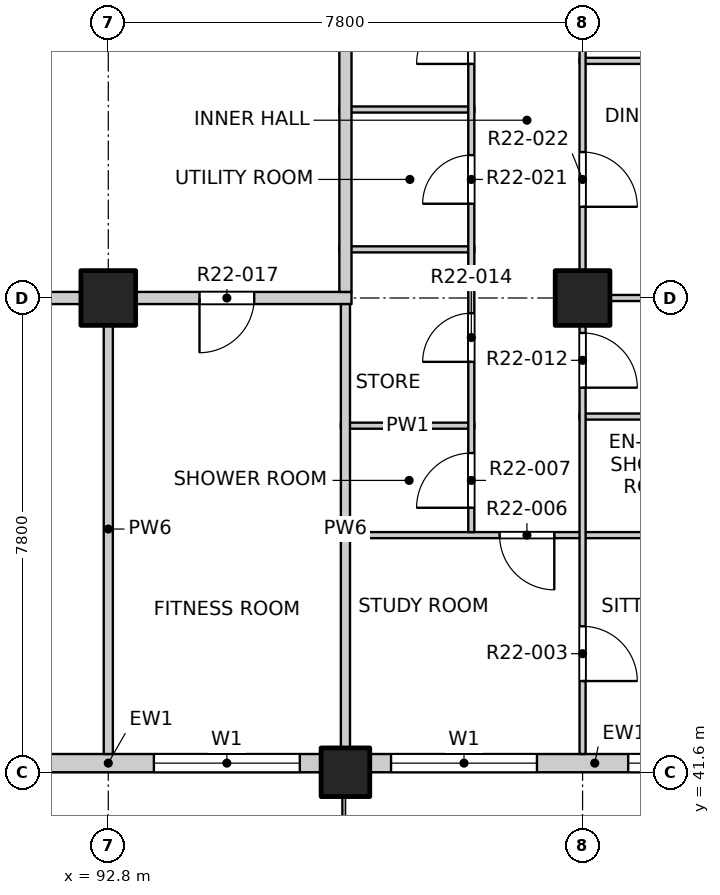
"""IFC4 building model, lengths in metres.
Left out: names, types, materials, properties, quantities, classifications, styles, units other than length and angle.
Written with IfcOpenShell. Run it as: python <this file> out.ifc"""

import sys

from ifc_helpers import new_model, si_unit, direction, frame, frame_2d, origin, origin_2d, place, context, subcontext, project, spatial, rectangle, extrude, element, fill, save


model = new_model("IFC4")
c1 = context("Model", 3, precision=1e-05, world=origin(), true_north=direction((0.0, 1.0)))
c2 = subcontext(c1, "Body", "Model", "MODEL_VIEW")
j1 = project(units=[si_unit("LENGTHUNIT", "METRE"), si_unit("PLANEANGLEUNIT", "RADIAN")], contexts=[c1])
p1 = place(None, origin())
s1 = spatial("IfcSite", under=j1, at=p1, CompositionType="ELEMENT")
p2 = place(p1, origin())
s2 = spatial("IfcBuilding", under=s1, at=p2, CompositionType="ELEMENT")
p3 = place(p2, frame((0.0, 0.0, 224.5)))
s3 = spatial("IfcBuildingStorey", under=s2, at=p3, CompositionType="ELEMENT", Elevation=224.5)
p4 = place(p3, frame((96.7, 41.6, -0.25), z_axis=(0.0, 0.0, 1.0), x_axis=(1.0, 0.0, 0.0)))
e1 = element("IfcColumn", 1, at=p4, inside=s3, PredefinedType="COLUMN", context=c2, shape_type="SweptSolid", body=[
    extrude(rectangle(XDim=0.8, YDim=0.8, at=origin_2d()), origin(), (0.0, 0.0, 1.0), 3.4),
])
for number, where, z_axis, x_axis in (
    (2, (92.8, 49.4, -0.25), (0.0, 0.0, 1.0), (1.0, 0.0, 0.0)),
    (3, (100.6, 49.4, -0.25), (0.0, 0.0, 1.0), (1.0, 0.0, 0.0)),
):
    element("IfcColumn", number, at=place(p3, frame(where, z_axis=z_axis, x_axis=x_axis)), inside=s3, PredefinedType="COLUMN", context=c2, shape_type="SweptSolid", body=[
        extrude(rectangle(XDim=0.9, YDim=0.9, at=origin_2d()), origin(), (0.0, 0.0, 1.0), 3.4),
    ])
p5 = place(p3, frame((89.3, 41.75, 0.0), z_axis=(0.0, 0.0, 1.0), x_axis=(1.0, 0.0, 0.0)))
e4 = element("IfcWall", 4, at=p5, inside=s3, PredefinedType="SOLIDWALL", context=c2, shape_type="SweptSolid", body=[
    extrude(rectangle(XDim=7.0, YDim=0.3, at=frame_2d((3.5, 0.0))), origin(), (0.0, 0.0, 1.0), 2.7),
])
p6 = place(p5, frame((0.65, 0.0, 0.0)))
e5 = element("IfcOpeningElement", 5, at=p6, cuts=e4, PredefinedType="OPENING", context=c2, shape_type="SweptSolid", body=[
    extrude(rectangle(XDim=1.8, YDim=2.4, at=frame_2d((0.9, 1.2))), frame((0.0, 0.16, 0.0), z_axis=(0.0, -1.0, 0.0), x_axis=(1.0, 0.0, 0.0)), (0.0, 0.0, 1.0), 0.32),
])
p7 = place(p5, frame((4.25, 0.0, 0.9)))
e6 = element("IfcOpeningElement", 6, at=p7, cuts=e4, PredefinedType="OPENING", context=c2, shape_type="SweptSolid", body=[
    extrude(rectangle(XDim=2.4, YDim=1.8, at=frame_2d((1.2, 0.9))), frame((0.0, 0.16, 0.0), z_axis=(0.0, -1.0, 0.0), x_axis=(1.0, 0.0, 0.0)), (0.0, 0.0, 1.0), 0.32),
])
p8 = place(p3, frame((97.1, 41.75, 0.0), z_axis=(0.0, 0.0, 1.0), x_axis=(1.0, 0.0, 0.0)))
e7 = element("IfcWall", 7, at=p8, inside=s3, PredefinedType="SOLIDWALL", context=c2, shape_type="SweptSolid", body=[
    extrude(rectangle(XDim=7.4, YDim=0.3, at=frame_2d((3.7, 0.0))), origin(), (0.0, 0.0, 1.0), 2.7),
])
p9 = place(p8, frame((0.35, 0.0, 0.9)))
e8 = element("IfcOpeningElement", 8, at=p9, cuts=e7, PredefinedType="OPENING", context=c2, shape_type="SweptSolid", body=[
    extrude(rectangle(XDim=2.4, YDim=1.8, at=frame_2d((1.2, 0.9))), frame((0.0, 0.16, 0.0), z_axis=(0.0, -1.0, 0.0), x_axis=(1.0, 0.0, 0.0)), (0.0, 0.0, 1.0), 0.32),
])
p10 = place(p8, frame((4.25, 0.0, 0.9)))
e9 = element("IfcOpeningElement", 9, at=p10, cuts=e7, PredefinedType="OPENING", context=c2, shape_type="SweptSolid", body=[
    extrude(rectangle(XDim=2.4, YDim=1.8, at=frame_2d((1.2, 0.9))), frame((0.0, 0.16, 0.0), z_axis=(0.0, -1.0, 0.0), x_axis=(1.0, 0.0, 0.0)), (0.0, 0.0, 1.0), 0.32),
])
p11 = place(p3, frame((96.625, 45.5, 0.0), z_axis=(0.0, 0.0, 1.0), x_axis=(1.0, 0.0, 0.0)))
e10 = element("IfcWall", 10, at=p11, inside=s3, PredefinedType="PARTITIONING", context=c2, shape_type="SweptSolid", body=[
    extrude(rectangle(XDim=11.475, YDim=0.1, at=frame_2d((5.738, 0.0))), origin(), (0.0, 0.0, 1.0), 3.15),
])
p12 = place(p11, frame((2.61, 0.0, 0.0)))
e11 = element("IfcOpeningElement", 11, at=p12, cuts=e10, PredefinedType="OPENING", context=c2, shape_type="SweptSolid", body=[
    extrude(rectangle(XDim=0.9, YDim=2.1, at=frame_2d((0.45, 1.05))), frame((0.0, 0.06, 0.0), z_axis=(0.0, -1.0, 0.0), x_axis=(1.0, 0.0, 0.0)), (0.0, 0.0, 1.0), 0.12),
])
p13 = place(p3, frame((96.625, 47.3, 0.0), z_axis=(0.0, 0.0, 1.0), x_axis=(1.0, 0.0, 0.0)))
e12 = element("IfcWall", 12, at=p13, inside=s3, PredefinedType="PARTITIONING", context=c2, shape_type="SweptSolid", body=[
    extrude(rectangle(XDim=2.195, YDim=0.1, at=frame_2d((1.098, 0.0))), origin(), (0.0, 0.0, 1.0), 3.15),
])
p14 = place(p3, frame((100.55, 47.45, 0.0), z_axis=(0.0, 0.0, 1.0), x_axis=(1.0, 0.0, 0.0)))
e13 = element("IfcWall", 13, at=p14, inside=s3, PredefinedType="PARTITIONING", context=c2, shape_type="SweptSolid", body=[
    extrude(rectangle(XDim=3.7, YDim=0.1, at=frame_2d((1.85, 0.0))), origin(), (0.0, 0.0, 1.0), 3.15),
])
p15 = place(p3, frame((73.2, 49.4, 0.0), z_axis=(0.0, 0.0, 1.0), x_axis=(1.0, 0.0, 0.0)))
e14 = element("IfcWall", 14, at=p15, inside=s3, PredefinedType="PARTITIONING", context=c2, shape_type="SweptSolid", body=[
    extrude(rectangle(XDim=23.6, YDim=0.2, at=frame_2d((11.8, 0.0))), origin(), (0.0, 0.0, 1.0), 3.15),
])
p16 = place(p15, frame((5.35, 0.0, 0.0)))
e15 = element("IfcOpeningElement", 15, at=p16, cuts=e14, PredefinedType="OPENING", context=c2, shape_type="SweptSolid", body=[
    extrude(rectangle(XDim=1.2, YDim=2.1, at=frame_2d((0.6, 1.05))), frame((0.0, 0.11, 0.0), z_axis=(0.0, -1.0, 0.0), x_axis=(1.0, 0.0, 0.0)), (0.0, 0.0, 1.0), 0.22),
])
p17 = place(p15, frame((15.1, 0.0, 0.0)))
e16 = element("IfcOpeningElement", 16, at=p17, cuts=e14, PredefinedType="OPENING", context=c2, shape_type="SweptSolid", body=[
    extrude(rectangle(XDim=1.2, YDim=2.1, at=frame_2d((0.6, 1.05))), frame((0.0, 0.11, 0.0), z_axis=(0.0, -1.0, 0.0), x_axis=(1.0, 0.0, 0.0)), (0.0, 0.0, 1.0), 0.22),
])
p18 = place(p15, frame((21.1, 0.0, 0.0)))
e17 = element("IfcOpeningElement", 17, at=p18, cuts=e14, PredefinedType="OPENING", context=c2, shape_type="SweptSolid", body=[
    extrude(rectangle(XDim=0.9, YDim=2.1, at=frame_2d((0.45, 1.05))), frame((0.0, 0.11, 0.0), z_axis=(0.0, -1.0, 0.0), x_axis=(1.0, 0.0, 0.0)), (0.0, 0.0, 1.0), 0.22),
])
p19 = place(p3, frame((100.55, 49.4, 0.0), z_axis=(0.0, 0.0, 1.0), x_axis=(1.0, 0.0, 0.0)))
e18 = element("IfcWall", 18, at=p19, inside=s3, PredefinedType="PARTITIONING", context=c2, shape_type="SweptSolid", body=[
    extrude(rectangle(XDim=7.55, YDim=0.1, at=frame_2d((3.775, 0.0))), origin(), (0.0, 0.0, 1.0), 3.15),
])
for number, where, z_axis, x_axis in (
    (19, (96.6, 50.2, 0.0), (0.0, 0.0, 1.0), (1.0, 0.0, 0.0)),
    (20, (96.6, 52.5, 0.0), (0.0, 0.0, 1.0), (1.0, 0.0, 0.0)),
):
    element("IfcWall", number, at=place(p3, frame(where, z_axis=z_axis, x_axis=x_axis)), inside=s3, PredefinedType="PARTITIONING", context=c2, shape_type="SweptSolid", body=[
        extrude(rectangle(XDim=2.22, YDim=0.1, at=frame_2d((1.11, 0.0))), origin(), (0.0, 0.0, 1.0), 3.15),
    ])
p20 = place(p3, frame((100.55, 53.3, 0.0), z_axis=(0.0, 0.0, 1.0), x_axis=(1.0, 0.0, 0.0)))
e21 = element("IfcWall", 21, at=p20, inside=s3, PredefinedType="PARTITIONING", context=c2, shape_type="SweptSolid", body=[
    extrude(rectangle(XDim=7.55, YDim=0.1, at=frame_2d((3.775, 0.0))), origin(), (0.0, 0.0, 1.0), 3.15),
])
for number, where, z_axis, x_axis in (
    (22, (92.8, 41.9, 0.0), (0.0, 0.0, 1.0), (0.0, 1.0, 0.0)),
    (23, (96.7, 41.9, 0.0), (0.0, 0.0, 1.0), (0.0, 1.0, 0.0)),
):
    element("IfcWall", number, at=place(p3, frame(where, z_axis=z_axis, x_axis=x_axis)), inside=s3, PredefinedType="PARTITIONING", context=c2, shape_type="SweptSolid", body=[
        extrude(rectangle(XDim=7.4, YDim=0.15, at=frame_2d((3.7, 0.0))), origin(), (0.0, 0.0, 1.0), 3.15),
    ])
p21 = place(p3, frame((96.7, 49.5, 0.0), z_axis=(0.0, 0.0, 1.0), x_axis=(0.0, 1.0, 0.0)))
e24 = element("IfcWall", 24, at=p21, inside=s3, PredefinedType="PARTITIONING", context=c2, shape_type="SweptSolid", body=[
    extrude(rectangle(XDim=34.9, YDim=0.2, at=frame_2d((17.45, 0.0))), origin(), (0.0, 0.0, 1.0), 3.15),
])
p22 = place(p21, frame((9.675, 0.0, 0.0)))
e25 = element("IfcOpeningElement", 25, at=p22, cuts=e24, PredefinedType="OPENING", context=c2, shape_type="SweptSolid", body=[
    extrude(rectangle(XDim=1.0, YDim=2.1, at=frame_2d((0.5, 1.05))), frame((0.0, 0.11, 0.0), z_axis=(0.0, -1.0, 0.0), x_axis=(1.0, 0.0, 0.0)), (0.0, 0.0, 1.0), 0.22),
])
p23 = place(p21, frame((22.925, 0.0, 0.0)))
e26 = element("IfcOpeningElement", 26, at=p23, cuts=e24, PredefinedType="OPENING", context=c2, shape_type="SweptSolid", body=[
    extrude(rectangle(XDim=1.0, YDim=2.1, at=frame_2d((0.5, 1.05))), frame((0.0, 0.11, 0.0), z_axis=(0.0, -1.0, 0.0), x_axis=(1.0, 0.0, 0.0)), (0.0, 0.0, 1.0), 0.22),
])
p24 = place(p21, frame((33.025, 0.0, 0.0)))
e27 = element("IfcOpeningElement", 27, at=p24, cuts=e24, PredefinedType="OPENING", context=c2, shape_type="SweptSolid", body=[
    extrude(rectangle(XDim=1.0, YDim=2.1, at=frame_2d((0.5, 1.05))), frame((0.0, 0.11, 0.0), z_axis=(0.0, -1.0, 0.0), x_axis=(1.0, 0.0, 0.0)), (0.0, 0.0, 1.0), 0.22),
])
p25 = place(p3, frame((98.77, 45.55, 0.0), z_axis=(0.0, 0.0, 1.0), x_axis=(0.0, 1.0, 0.0)))
e28 = element("IfcWall", 28, at=p25, inside=s3, PredefinedType="PARTITIONING", context=c2, shape_type="SweptSolid", body=[
    extrude(rectangle(XDim=12.3, YDim=0.1, at=frame_2d((6.15, 0.0))), origin(), (0.0, 0.0, 1.0), 3.15),
])
p26 = place(p25, frame((0.4, 0.0, 0.0)))
e29 = element("IfcOpeningElement", 29, at=p26, cuts=e28, PredefinedType="OPENING", context=c2, shape_type="SweptSolid", body=[
    extrude(rectangle(XDim=0.9, YDim=2.1, at=frame_2d((0.45, 1.05))), frame((0.0, 0.06, 0.0), z_axis=(0.0, -1.0, 0.0), x_axis=(1.0, 0.0, 0.0)), (0.0, 0.0, 1.0), 0.12),
])
p27 = place(p25, frame((2.8, 0.0, 0.0)))
e30 = element("IfcOpeningElement", 30, at=p27, cuts=e28, PredefinedType="OPENING", context=c2, shape_type="SweptSolid", body=[
    extrude(rectangle(XDim=0.8, YDim=2.1, at=frame_2d((0.4, 1.05))), frame((0.0, 0.06, 0.0), z_axis=(0.0, -1.0, 0.0), x_axis=(1.0, 0.0, 0.0)), (0.0, 0.0, 1.0), 0.12),
])
p28 = place(p25, frame((5.4, 0.0, 0.0)))
e31 = element("IfcOpeningElement", 31, at=p28, cuts=e28, PredefinedType="OPENING", context=c2, shape_type="SweptSolid", body=[
    extrude(rectangle(XDim=0.8, YDim=2.1, at=frame_2d((0.4, 1.05))), frame((0.0, 0.06, 0.0), z_axis=(0.0, -1.0, 0.0), x_axis=(1.0, 0.0, 0.0)), (0.0, 0.0, 1.0), 0.12),
])
p29 = place(p25, frame((7.7, 0.0, 0.0)))
e32 = element("IfcOpeningElement", 32, at=p29, cuts=e28, PredefinedType="OPENING", context=c2, shape_type="SweptSolid", body=[
    extrude(rectangle(XDim=0.9, YDim=2.1, at=frame_2d((0.45, 1.05))), frame((0.0, 0.06, 0.0), z_axis=(0.0, -1.0, 0.0), x_axis=(1.0, 0.0, 0.0)), (0.0, 0.0, 1.0), 0.12),
])
p30 = place(p25, frame((10.45, 0.0, 0.0)))
e33 = element("IfcOpeningElement", 33, at=p30, cuts=e28, PredefinedType="OPENING", context=c2, shape_type="SweptSolid", body=[
    extrude(rectangle(XDim=0.8, YDim=2.1, at=frame_2d((0.4, 1.05))), frame((0.0, 0.06, 0.0), z_axis=(0.0, -1.0, 0.0), x_axis=(1.0, 0.0, 0.0)), (0.0, 0.0, 1.0), 0.12),
])
p31 = place(p3, frame((100.6, 41.9, 0.0), z_axis=(0.0, 0.0, 1.0), x_axis=(0.0, 1.0, 0.0)))
e34 = element("IfcWall", 34, at=p31, inside=s3, PredefinedType="PARTITIONING", context=c2, shape_type="SweptSolid", body=[
    extrude(rectangle(XDim=46.2, YDim=0.1, at=frame_2d((23.1, 0.0))), origin(), (0.0, 0.0, 1.0), 3.15),
])
p32 = place(p31, frame((1.2, 0.0, 0.0)))
e35 = element("IfcOpeningElement", 35, at=p32, cuts=e34, PredefinedType="OPENING", context=c2, shape_type="SweptSolid", body=[
    extrude(rectangle(XDim=0.9, YDim=2.1, at=frame_2d((0.45, 1.05))), frame((0.0, 0.06, 0.0), z_axis=(0.0, -1.0, 0.0), x_axis=(1.0, 0.0, 0.0)), (0.0, 0.0, 1.0), 0.12),
])
p33 = place(p31, frame((6.025, 0.0, 0.0)))
e36 = element("IfcOpeningElement", 36, at=p33, cuts=e34, PredefinedType="OPENING", context=c2, shape_type="SweptSolid", body=[
    extrude(rectangle(XDim=0.9, YDim=2.1, at=frame_2d((0.45, 1.05))), frame((0.0, 0.06, 0.0), z_axis=(0.0, -1.0, 0.0), x_axis=(1.0, 0.0, 0.0)), (0.0, 0.0, 1.0), 0.12),
])
p34 = place(p31, frame((9.0, 0.0, 0.0)))
e37 = element("IfcOpeningElement", 37, at=p34, cuts=e34, PredefinedType="OPENING", context=c2, shape_type="SweptSolid", body=[
    extrude(rectangle(XDim=0.9, YDim=2.1, at=frame_2d((0.45, 1.05))), frame((0.0, 0.06, 0.0), z_axis=(0.0, -1.0, 0.0), x_axis=(1.0, 0.0, 0.0)), (0.0, 0.0, 1.0), 0.12),
])
p35 = place(p31, frame((12.9, 0.0, 0.0)))
e38 = element("IfcOpeningElement", 38, at=p35, cuts=e34, PredefinedType="OPENING", context=c2, shape_type="SweptSolid", body=[
    extrude(rectangle(XDim=0.9, YDim=2.1, at=frame_2d((0.45, 1.05))), frame((0.0, 0.06, 0.0), z_axis=(0.0, -1.0, 0.0), x_axis=(1.0, 0.0, 0.0)), (0.0, 0.0, 1.0), 0.12),
])
p36 = place(p31, frame((17.775, 0.0, 0.0)))
e39 = element("IfcOpeningElement", 39, at=p36, cuts=e34, PredefinedType="OPENING", context=c2, shape_type="SweptSolid", body=[
    extrude(rectangle(XDim=0.9, YDim=2.1, at=frame_2d((0.45, 1.05))), frame((0.0, 0.06, 0.0), z_axis=(0.0, -1.0, 0.0), x_axis=(1.0, 0.0, 0.0)), (0.0, 0.0, 1.0), 0.12),
])
p37 = place(p31, frame((21.625, 0.0, 0.0)))
e40 = element("IfcOpeningElement", 40, at=p37, cuts=e34, PredefinedType="OPENING", context=c2, shape_type="SweptSolid", body=[
    extrude(rectangle(XDim=0.9, YDim=2.1, at=frame_2d((0.45, 1.05))), frame((0.0, 0.06, 0.0), z_axis=(0.0, -1.0, 0.0), x_axis=(1.0, 0.0, 0.0)), (0.0, 0.0, 1.0), 0.12),
])
p38 = place(p31, frame((25.575, 0.0, 0.0)))
e41 = element("IfcOpeningElement", 41, at=p38, cuts=e34, PredefinedType="OPENING", context=c2, shape_type="SweptSolid", body=[
    extrude(rectangle(XDim=0.9, YDim=2.1, at=frame_2d((0.45, 1.05))), frame((0.0, 0.06, 0.0), z_axis=(0.0, -1.0, 0.0), x_axis=(1.0, 0.0, 0.0)), (0.0, 0.0, 1.0), 0.12),
])
p39 = place(p31, frame((28.5, 0.0, 0.0)))
e42 = element("IfcOpeningElement", 42, at=p39, cuts=e34, PredefinedType="OPENING", context=c2, shape_type="SweptSolid", body=[
    extrude(rectangle(XDim=0.9, YDim=2.1, at=frame_2d((0.45, 1.05))), frame((0.0, 0.06, 0.0), z_axis=(0.0, -1.0, 0.0), x_axis=(1.0, 0.0, 0.0)), (0.0, 0.0, 1.0), 0.12),
])
p40 = place(p31, frame((33.375, 0.0, 0.0)))
e43 = element("IfcOpeningElement", 43, at=p40, cuts=e34, PredefinedType="OPENING", context=c2, shape_type="SweptSolid", body=[
    extrude(rectangle(XDim=0.9, YDim=2.1, at=frame_2d((0.45, 1.05))), frame((0.0, 0.06, 0.0), z_axis=(0.0, -1.0, 0.0), x_axis=(1.0, 0.0, 0.0)), (0.0, 0.0, 1.0), 0.12),
])
p41 = place(p31, frame((36.3, 0.0, 0.0)))
e44 = element("IfcOpeningElement", 44, at=p41, cuts=e34, PredefinedType="OPENING", context=c2, shape_type="SweptSolid", body=[
    extrude(rectangle(XDim=0.9, YDim=2.1, at=frame_2d((0.45, 1.05))), frame((0.0, 0.06, 0.0), z_axis=(0.0, -1.0, 0.0), x_axis=(1.0, 0.0, 0.0)), (0.0, 0.0, 1.0), 0.12),
])
p42 = place(p31, frame((40.2, 0.0, 0.0)))
e45 = element("IfcOpeningElement", 45, at=p42, cuts=e34, PredefinedType="OPENING", context=c2, shape_type="SweptSolid", body=[
    extrude(rectangle(XDim=0.9, YDim=2.1, at=frame_2d((0.45, 1.05))), frame((0.0, 0.06, 0.0), z_axis=(0.0, -1.0, 0.0), x_axis=(1.0, 0.0, 0.0)), (0.0, 0.0, 1.0), 0.12),
])
p43 = place(p31, frame((44.1, 0.0, 0.0)))
e46 = element("IfcOpeningElement", 46, at=p43, cuts=e34, PredefinedType="OPENING", context=c2, shape_type="SweptSolid", body=[
    extrude(rectangle(XDim=0.9, YDim=2.1, at=frame_2d((0.45, 1.05))), frame((0.0, 0.06, 0.0), z_axis=(0.0, -1.0, 0.0), x_axis=(1.0, 0.0, 0.0)), (0.0, 0.0, 1.0), 0.12),
])
p44 = place(p7, origin())
e47 = element("IfcWindow", 47, at=p44, inside=s3, PartitioningType="DOUBLE_PANEL_VERTICAL", PredefinedType="WINDOW", context=c2, shape_type="SweptSolid", body=[
    extrude(rectangle(XDim=2.4, YDim=1.8, at=frame_2d((1.2, 0.9))), frame((0.0, 0.03, 0.0), z_axis=(0.0, -1.0, 0.0), x_axis=(1.0, 0.0, 0.0)), (0.0, 0.0, 1.0), 0.06),
])
fill(e6, e47)
p45 = place(p9, origin())
e48 = element("IfcWindow", 48, at=p45, inside=s3, PartitioningType="DOUBLE_PANEL_VERTICAL", PredefinedType="WINDOW", context=c2, shape_type="SweptSolid", body=[
    extrude(rectangle(XDim=2.4, YDim=1.8, at=frame_2d((1.2, 0.9))), frame((0.0, 0.03, 0.0), z_axis=(0.0, -1.0, 0.0), x_axis=(1.0, 0.0, 0.0)), (0.0, 0.0, 1.0), 0.06),
])
fill(e8, e48)
p46 = place(p10, origin())
e49 = element("IfcWindow", 49, at=p46, inside=s3, PartitioningType="DOUBLE_PANEL_VERTICAL", PredefinedType="WINDOW", context=c2, shape_type="SweptSolid", body=[
    extrude(rectangle(XDim=2.4, YDim=1.8, at=frame_2d((1.2, 0.9))), frame((0.0, 0.03, 0.0), z_axis=(0.0, -1.0, 0.0), x_axis=(1.0, 0.0, 0.0)), (0.0, 0.0, 1.0), 0.06),
])
fill(e9, e49)
p47 = place(p32, origin())
e50 = element("IfcDoor", 50, at=p47, inside=s3, OperationType="SINGLE_SWING_RIGHT", PredefinedType="DOOR", context=c2, shape_type="SweptSolid", body=[
    extrude(rectangle(XDim=0.9, YDim=2.1, at=frame_2d((0.45, 1.05))), frame((0.0, 0.025, 0.0), z_axis=(0.0, -1.0, 0.0), x_axis=(1.0, 0.0, 0.0)), (0.0, 0.0, 1.0), 0.05),
])
fill(e35, e50)
p48 = place(p12, origin())
e51 = element("IfcDoor", 51, at=p48, inside=s3, OperationType="SINGLE_SWING_LEFT", PredefinedType="DOOR", context=c2, shape_type="SweptSolid", body=[
    extrude(rectangle(XDim=0.9, YDim=2.1, at=frame_2d((0.45, 1.05))), frame((0.0, 0.025, 0.0), z_axis=(0.0, -1.0, 0.0), x_axis=(1.0, 0.0, 0.0)), (0.0, 0.0, 1.0), 0.05),
])
fill(e11, e51)
p49 = place(p26, origin())
e52 = element("IfcDoor", 52, at=p49, inside=s3, OperationType="SINGLE_SWING_LEFT", PredefinedType="DOOR", context=c2, shape_type="SweptSolid", body=[
    extrude(rectangle(XDim=0.9, YDim=2.1, at=frame_2d((0.45, 1.05))), frame((0.0, 0.025, 0.0), z_axis=(0.0, -1.0, 0.0), x_axis=(1.0, 0.0, 0.0)), (0.0, 0.0, 1.0), 0.05),
])
fill(e29, e52)
p50 = place(p33, origin())
e53 = element("IfcDoor", 53, at=p50, inside=s3, OperationType="SINGLE_SWING_RIGHT", PredefinedType="DOOR", context=c2, shape_type="SweptSolid", body=[
    extrude(rectangle(XDim=0.9, YDim=2.1, at=frame_2d((0.45, 1.05))), frame((0.0, 0.025, 0.0), z_axis=(0.0, -1.0, 0.0), x_axis=(1.0, 0.0, 0.0)), (0.0, 0.0, 1.0), 0.05),
])
fill(e36, e53)
p51 = place(p27, origin())
e54 = element("IfcDoor", 54, at=p51, inside=s3, OperationType="SINGLE_SWING_LEFT", PredefinedType="DOOR", context=c2, shape_type="SweptSolid", body=[
    extrude(rectangle(XDim=0.8, YDim=2.1, at=frame_2d((0.4, 1.05))), frame((0.0, 0.025, 0.0), z_axis=(0.0, -1.0, 0.0), x_axis=(1.0, 0.0, 0.0)), (0.0, 0.0, 1.0), 0.05),
])
fill(e30, e54)
p52 = place(p18, origin())
e55 = element("IfcDoor", 55, at=p52, inside=s3, OperationType="SINGLE_SWING_RIGHT", PredefinedType="DOOR", context=c2, shape_type="SweptSolid", body=[
    extrude(rectangle(XDim=0.9, YDim=2.1, at=frame_2d((0.45, 1.05))), frame((0.0, 0.025, 0.0), z_axis=(0.0, -1.0, 0.0), x_axis=(1.0, 0.0, 0.0)), (0.0, 0.0, 1.0), 0.05),
])
fill(e17, e55)
p53 = place(p28, origin())
e56 = element("IfcDoor", 56, at=p53, inside=s3, OperationType="SINGLE_SWING_LEFT", PredefinedType="DOOR", context=c2, shape_type="SweptSolid", body=[
    extrude(rectangle(XDim=0.8, YDim=2.1, at=frame_2d((0.4, 1.05))), frame((0.0, 0.025, 0.0), z_axis=(0.0, -1.0, 0.0), x_axis=(1.0, 0.0, 0.0)), (0.0, 0.0, 1.0), 0.05),
])
fill(e31, e56)
p54 = place(p34, origin())
e57 = element("IfcDoor", 57, at=p54, inside=s3, OperationType="SINGLE_SWING_RIGHT", PredefinedType="DOOR", context=c2, shape_type="SweptSolid", body=[
    extrude(rectangle(XDim=0.9, YDim=2.1, at=frame_2d((0.45, 1.05))), frame((0.0, 0.025, 0.0), z_axis=(0.0, -1.0, 0.0), x_axis=(1.0, 0.0, 0.0)), (0.0, 0.0, 1.0), 0.05),
])
fill(e37, e57)
p55 = place(p29, origin())
e58 = element("IfcDoor", 58, at=p55, inside=s3, OperationType="SINGLE_SWING_LEFT", PredefinedType="DOOR", context=c2, shape_type="SweptSolid", body=[
    extrude(rectangle(XDim=0.9, YDim=2.1, at=frame_2d((0.45, 1.05))), frame((0.0, 0.025, 0.0), z_axis=(0.0, -1.0, 0.0), x_axis=(1.0, 0.0, 0.0)), (0.0, 0.0, 1.0), 0.05),
])
fill(e32, e58)
save(model, sys.argv[1])
